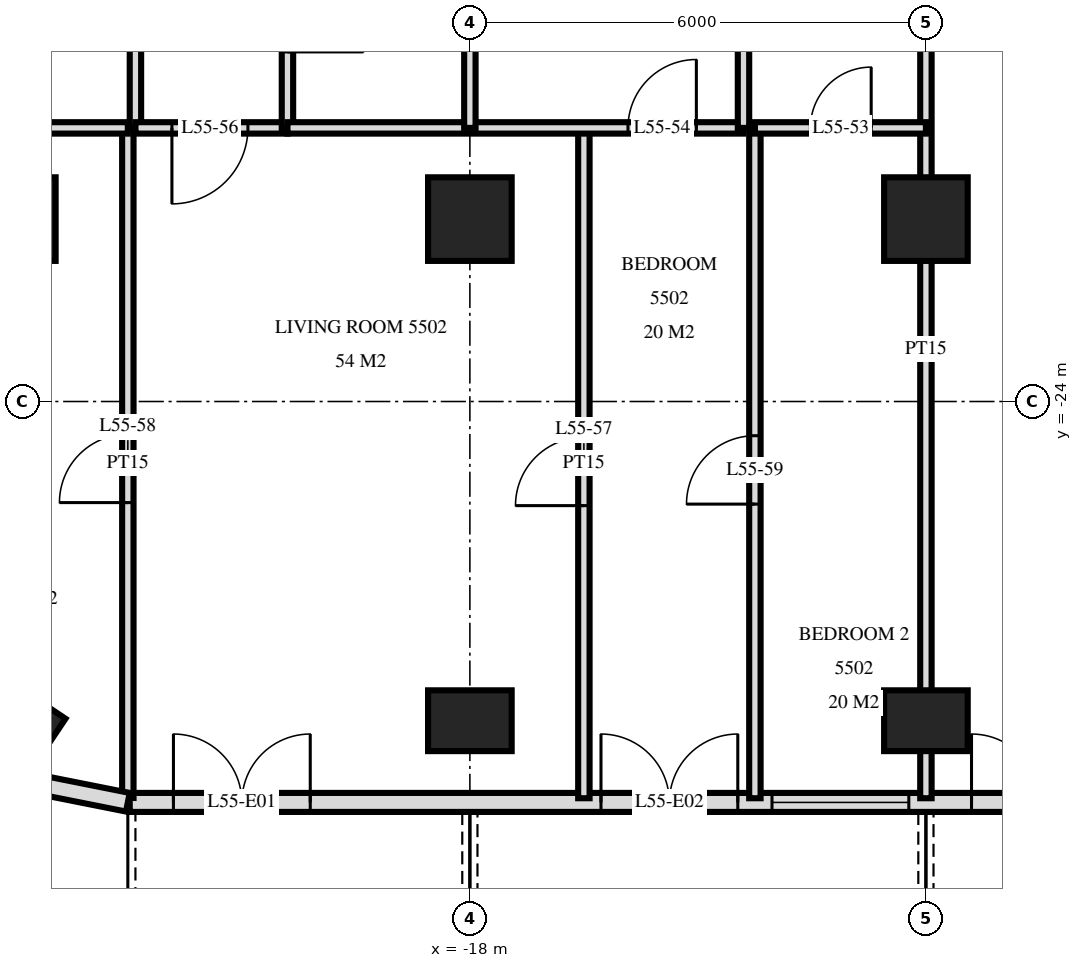
"""IFC4 building model, lengths in metres.
Left out: names, types, materials, properties, quantities, classifications, styles, units other than length and angle.
Written with IfcOpenShell. Run it as: python <this file> out.ifc"""

import sys

from ifc_helpers import new_model, si_unit, direction, frame, frame_2d, origin, origin_2d, place, context, subcontext, project, spatial, rectangle, extrude, element, fill, save


model = new_model("IFC4")
c1 = context("Model", 3, precision=1e-05, world=origin(), true_north=direction((0.0, 1.0)))
c2 = subcontext(c1, "Body", "Model", "MODEL_VIEW")
j1 = project(units=[si_unit("LENGTHUNIT", "METRE"), si_unit("PLANEANGLEUNIT", "RADIAN")], contexts=[c1])
p1 = place(None, origin())
s1 = spatial("IfcSite", under=j1, at=p1, CompositionType="ELEMENT")
p2 = place(p1, origin())
s2 = spatial("IfcBuilding", under=s1, at=p2, CompositionType="ELEMENT")
p3 = place(p2, frame((0.0, 0.0, 211.6)))
s3 = spatial("IfcBuildingStorey", under=s2, at=p3, CompositionType="ELEMENT", Elevation=211.6)
p4 = place(p3, frame((-24.0, -28.2, 0.0), z_axis=(0.0, 0.0, 1.0), x_axis=(-0.831459915646, 0.555584744817, 0.0)))
e1 = element("IfcColumn", 1, at=p4, inside=s3, PredefinedType="COLUMN", context=c2, shape_type="SweptSolid", body=[
    extrude(rectangle(XDim=1.1, YDim=0.8, at=origin_2d()), origin(), (0.0, 0.0, 1.0), 3.5),
])
p5 = place(p3, frame((-24.0, -21.6, 0.0), z_axis=(0.0, 0.0, 1.0), x_axis=(1.0, 0.0, 0.0)))
e2 = element("IfcColumn", 2, at=p5, inside=s3, PredefinedType="COLUMN", context=c2, shape_type="SweptSolid", body=[
    extrude(rectangle(XDim=1.1, YDim=1.1, at=origin_2d()), origin(), (0.0, 0.0, 1.0), 3.5),
])
p6 = place(p3, frame((-18.0, -28.2, 0.0), z_axis=(0.0, 0.0, 1.0), x_axis=(1.0, 0.0, 0.0)))
e3 = element("IfcColumn", 3, at=p6, inside=s3, PredefinedType="COLUMN", context=c2, shape_type="SweptSolid", body=[
    extrude(rectangle(XDim=1.1, YDim=0.8, at=origin_2d()), origin(), (0.0, 0.0, 1.0), 3.5),
])
p7 = place(p3, frame((-18.0, -21.6, 0.0), z_axis=(0.0, 0.0, 1.0), x_axis=(1.0, 0.0, 0.0)))
e4 = element("IfcColumn", 4, at=p7, inside=s3, PredefinedType="COLUMN", context=c2, shape_type="SweptSolid", body=[
    extrude(rectangle(XDim=1.1, YDim=1.1, at=origin_2d()), origin(), (0.0, 0.0, 1.0), 3.5),
])
p8 = place(p3, frame((-12.0, -28.2, 0.0), z_axis=(0.0, 0.0, 1.0), x_axis=(1.0, 0.0, 0.0)))
e5 = element("IfcColumn", 5, at=p8, inside=s3, PredefinedType="COLUMN", context=c2, shape_type="SweptSolid", body=[
    extrude(rectangle(XDim=1.1, YDim=0.8, at=origin_2d()), origin(), (0.0, 0.0, 1.0), 3.5),
])
p9 = place(p3, frame((-12.0, -21.6, 0.0), z_axis=(0.0, 0.0, 1.0), x_axis=(1.0, 0.0, 0.0)))
e6 = element("IfcColumn", 6, at=p9, inside=s3, PredefinedType="COLUMN", context=c2, shape_type="SweptSolid", body=[
    extrude(rectangle(XDim=1.1, YDim=1.1, at=origin_2d()), origin(), (0.0, 0.0, 1.0), 3.5),
])
p10 = place(p3, frame((-24.149, -28.945, 0.0), z_axis=(0.0, 0.0, 1.0), x_axis=(0.980775640221, -0.19513878023, 0.0)))
e7 = element("IfcWall", 7, at=p10, inside=s3, PredefinedType="SOLIDWALL", context=c2, shape_type="SweptSolid", body=[
    extrude(rectangle(XDim=1.681, YDim=0.25, at=frame_2d((0.841, 0.0))), origin(), (0.0, 0.0, 1.0), 3.22),
])
p11 = place(p3, frame((-22.475, -29.275, 0.0), z_axis=(0.0, 0.0, 1.0), x_axis=(1.0, 0.0, 0.0)))
e8 = element("IfcWall", 8, at=p11, inside=s3, PredefinedType="SOLIDWALL", context=c2, shape_type="SweptSolid", body=[
    extrude(rectangle(XDim=44.951, YDim=0.25, at=frame_2d((22.475, 0.0))), origin(), (0.0, 0.0, 1.0), 3.22),
])
p12 = place(p11, frame((0.575, 0.0, 0.0)))
e9 = element("IfcOpeningElement", 9, at=p12, cuts=e8, PredefinedType="OPENING", context=c2, shape_type="SweptSolid", body=[
    extrude(rectangle(XDim=1.8, YDim=2.4, at=frame_2d((0.9, 1.2))), frame((0.0, 0.135, 0.0), z_axis=(0.0, -1.0, 0.0), x_axis=(1.0, 0.0, 0.0)), (0.0, 0.0, 1.0), 0.27),
])
p13 = place(p11, frame((6.2, 0.0, 0.0)))
e10 = element("IfcOpeningElement", 10, at=p13, cuts=e8, PredefinedType="OPENING", context=c2, shape_type="SweptSolid", body=[
    extrude(rectangle(XDim=1.8, YDim=2.4, at=frame_2d((0.9, 1.2))), frame((0.0, 0.135, 0.0), z_axis=(0.0, -1.0, 0.0), x_axis=(1.0, 0.0, 0.0)), (0.0, 0.0, 1.0), 0.27),
])
p14 = place(p11, frame((8.45, 0.0, 0.9)))
e11 = element("IfcOpeningElement", 11, at=p14, cuts=e8, PredefinedType="OPENING", context=c2, shape_type="SweptSolid", body=[
    extrude(rectangle(XDim=1.8, YDim=1.5, at=frame_2d((0.9, 0.75))), frame((0.0, 0.135, 0.0), z_axis=(0.0, -1.0, 0.0), x_axis=(1.0, 0.0, 0.0)), (0.0, 0.0, 1.0), 0.27),
])
p15 = place(p11, frame((11.075, 0.0, 0.0)))
e12 = element("IfcOpeningElement", 12, at=p15, cuts=e8, PredefinedType="OPENING", context=c2, shape_type="SweptSolid", body=[
    extrude(rectangle(XDim=1.8, YDim=2.4, at=frame_2d((0.9, 1.2))), frame((0.0, 0.135, 0.0), z_axis=(0.0, -1.0, 0.0), x_axis=(1.0, 0.0, 0.0)), (0.0, 0.0, 1.0), 0.27),
])
p16 = place(p11, frame((13.775, 0.0, 0.9)))
e13 = element("IfcOpeningElement", 13, at=p16, cuts=e8, PredefinedType="OPENING", context=c2, shape_type="SweptSolid", body=[
    extrude(rectangle(XDim=2.4, YDim=1.5, at=frame_2d((1.2, 0.75))), frame((0.0, 0.135, 0.0), z_axis=(0.0, -1.0, 0.0), x_axis=(1.0, 0.0, 0.0)), (0.0, 0.0, 1.0), 0.27),
])
p17 = place(p11, frame((16.775, 0.0, 0.9)))
e14 = element("IfcOpeningElement", 14, at=p17, cuts=e8, PredefinedType="OPENING", context=c2, shape_type="SweptSolid", body=[
    extrude(rectangle(XDim=2.4, YDim=1.5, at=frame_2d((1.2, 0.75))), frame((0.0, 0.135, 0.0), z_axis=(0.0, -1.0, 0.0), x_axis=(1.0, 0.0, 0.0)), (0.0, 0.0, 1.0), 0.27),
])
p18 = place(p11, frame((20.075, 0.0, 0.0)))
e15 = element("IfcOpeningElement", 15, at=p18, cuts=e8, PredefinedType="OPENING", context=c2, shape_type="SweptSolid", body=[
    extrude(rectangle(XDim=1.8, YDim=2.4, at=frame_2d((0.9, 1.2))), frame((0.0, 0.135, 0.0), z_axis=(0.0, -1.0, 0.0), x_axis=(1.0, 0.0, 0.0)), (0.0, 0.0, 1.0), 0.27),
])
p19 = place(p11, frame((23.075, 0.0, 0.0)))
e16 = element("IfcOpeningElement", 16, at=p19, cuts=e8, PredefinedType="OPENING", context=c2, shape_type="SweptSolid", body=[
    extrude(rectangle(XDim=1.8, YDim=2.4, at=frame_2d((0.9, 1.2))), frame((0.0, 0.135, 0.0), z_axis=(0.0, -1.0, 0.0), x_axis=(1.0, 0.0, 0.0)), (0.0, 0.0, 1.0), 0.27),
])
p20 = place(p11, frame((25.775, 0.0, 0.9)))
e17 = element("IfcOpeningElement", 17, at=p20, cuts=e8, PredefinedType="OPENING", context=c2, shape_type="SweptSolid", body=[
    extrude(rectangle(XDim=2.4, YDim=1.5, at=frame_2d((1.2, 0.75))), frame((0.0, 0.135, 0.0), z_axis=(0.0, -1.0, 0.0), x_axis=(1.0, 0.0, 0.0)), (0.0, 0.0, 1.0), 0.27),
])
p21 = place(p11, frame((29.075, 0.0, 0.0)))
e18 = element("IfcOpeningElement", 18, at=p21, cuts=e8, PredefinedType="OPENING", context=c2, shape_type="SweptSolid", body=[
    extrude(rectangle(XDim=1.8, YDim=2.4, at=frame_2d((0.9, 1.2))), frame((0.0, 0.135, 0.0), z_axis=(0.0, -1.0, 0.0), x_axis=(1.0, 0.0, 0.0)), (0.0, 0.0, 1.0), 0.27),
])
p22 = place(p11, frame((31.775, 0.0, 0.9)))
e19 = element("IfcOpeningElement", 19, at=p22, cuts=e8, PredefinedType="OPENING", context=c2, shape_type="SweptSolid", body=[
    extrude(rectangle(XDim=2.4, YDim=1.5, at=frame_2d((1.2, 0.75))), frame((0.0, 0.135, 0.0), z_axis=(0.0, -1.0, 0.0), x_axis=(1.0, 0.0, 0.0)), (0.0, 0.0, 1.0), 0.27),
])
p23 = place(p11, frame((34.775, 0.0, 0.9)))
e20 = element("IfcOpeningElement", 20, at=p23, cuts=e8, PredefinedType="OPENING", context=c2, shape_type="SweptSolid", body=[
    extrude(rectangle(XDim=2.4, YDim=1.5, at=frame_2d((1.2, 0.75))), frame((0.0, 0.135, 0.0), z_axis=(0.0, -1.0, 0.0), x_axis=(1.0, 0.0, 0.0)), (0.0, 0.0, 1.0), 0.27),
])
p24 = place(p11, frame((38.075, 0.0, 0.0)))
e21 = element("IfcOpeningElement", 21, at=p24, cuts=e8, PredefinedType="OPENING", context=c2, shape_type="SweptSolid", body=[
    extrude(rectangle(XDim=1.8, YDim=2.4, at=frame_2d((0.9, 1.2))), frame((0.0, 0.135, 0.0), z_axis=(0.0, -1.0, 0.0), x_axis=(1.0, 0.0, 0.0)), (0.0, 0.0, 1.0), 0.27),
])
p25 = place(p11, frame((41.075, 0.0, 0.0)))
e22 = element("IfcOpeningElement", 22, at=p25, cuts=e8, PredefinedType="OPENING", context=c2, shape_type="SweptSolid", body=[
    extrude(rectangle(XDim=1.8, YDim=2.4, at=frame_2d((0.9, 1.2))), frame((0.0, 0.135, 0.0), z_axis=(0.0, -1.0, 0.0), x_axis=(1.0, 0.0, 0.0)), (0.0, 0.0, 1.0), 0.27),
])
p26 = place(p3, frame((-12.0, -29.22, 0.0), z_axis=(0.0, 0.0, 1.0), x_axis=(0.0, 1.0, 0.0)))
e23 = element("IfcWall", 23, at=p26, inside=s3, PredefinedType="PARTITIONING", context=c2, shape_type="SweptSolid", body=[
    extrude(rectangle(XDim=11.82, YDim=0.15, at=frame_2d((5.91, 0.0))), origin(), (0.0, 0.0, 1.0), 3.22),
])
p27 = place(p3, frame((-14.25, -29.22, 0.0), z_axis=(0.0, 0.0, 1.0), x_axis=(0.0, 1.0, 0.0)))
e24 = element("IfcWall", 24, at=p27, inside=s3, PredefinedType="PARTITIONING", context=c2, shape_type="SweptSolid", body=[
    extrude(rectangle(XDim=8.82, YDim=0.15, at=frame_2d((4.41, 0.0))), origin(), (0.0, 0.0, 1.0), 3.22),
])
p28 = place(p27, frame((3.87, 0.0, 0.0)))
e25 = element("IfcOpeningElement", 25, at=p28, cuts=e24, PredefinedType="OPENING", context=c2, shape_type="SweptSolid", body=[
    extrude(rectangle(XDim=0.9, YDim=2.1, at=frame_2d((0.45, 1.05))), frame((0.0, 0.085, 0.0), z_axis=(0.0, -1.0, 0.0), x_axis=(1.0, 0.0, 0.0)), (0.0, 0.0, 1.0), 0.17),
])
p29 = place(p3, frame((-14.4, -20.4, 0.0), z_axis=(0.0, 0.0, 1.0), x_axis=(0.0, 1.0, 0.0)))
e26 = element("IfcWall", 26, at=p29, inside=s3, PredefinedType="PARTITIONING", context=c2, shape_type="SweptSolid", body=[
    extrude(rectangle(XDim=3.0, YDim=0.15, at=frame_2d((1.5, 0.0))), origin(), (0.0, 0.0, 1.0), 3.22),
])
p30 = place(p3, frame((-16.5, -29.22, 0.0), z_axis=(0.0, 0.0, 1.0), x_axis=(0.0, 1.0, 0.0)))
e27 = element("IfcWall", 27, at=p30, inside=s3, PredefinedType="PARTITIONING", context=c2, shape_type="SweptSolid", body=[
    extrude(rectangle(XDim=8.82, YDim=0.15, at=frame_2d((4.41, 0.0))), origin(), (0.0, 0.0, 1.0), 3.22),
])
p31 = place(p30, frame((3.85, 0.0, 0.0)))
e28 = element("IfcOpeningElement", 28, at=p31, cuts=e27, PredefinedType="OPENING", context=c2, shape_type="SweptSolid", body=[
    extrude(rectangle(XDim=0.9, YDim=2.1, at=frame_2d((0.45, 1.05))), frame((0.0, 0.085, 0.0), z_axis=(0.0, -1.0, 0.0), x_axis=(1.0, 0.0, 0.0)), (0.0, 0.0, 1.0), 0.17),
])
p32 = place(p3, frame((-18.0, -20.4, 0.0), z_axis=(0.0, 0.0, 1.0), x_axis=(0.0, 1.0, 0.0)))
e29 = element("IfcWall", 29, at=p32, inside=s3, PredefinedType="PARTITIONING", context=c2, shape_type="SweptSolid", body=[
    extrude(rectangle(XDim=3.0, YDim=0.15, at=frame_2d((1.5, 0.0))), origin(), (0.0, 0.0, 1.0), 3.22),
])
p33 = place(p3, frame((-20.4, -20.4, 0.0), z_axis=(0.0, 0.0, 1.0), x_axis=(0.0, 1.0, 0.0)))
e30 = element("IfcWall", 30, at=p33, inside=s3, PredefinedType="PARTITIONING", context=c2, shape_type="SweptSolid", body=[
    extrude(rectangle(XDim=3.0, YDim=0.15, at=frame_2d((1.5, 0.0))), origin(), (0.0, 0.0, 1.0), 3.22),
])
p34 = place(p33, frame((1.0, 0.0, 0.0)))
e31 = element("IfcOpeningElement", 31, at=p34, cuts=e30, PredefinedType="OPENING", context=c2, shape_type="SweptSolid", body=[
    extrude(rectangle(XDim=1.0, YDim=2.1, at=frame_2d((0.5, 1.05))), frame((0.0, 0.085, 0.0), z_axis=(0.0, -1.0, 0.0), x_axis=(1.0, 0.0, 0.0)), (0.0, 0.0, 1.0), 0.17),
])
p35 = place(p3, frame((-22.4, -20.4, 0.0), z_axis=(0.0, 0.0, 1.0), x_axis=(0.0, 1.0, 0.0)))
e32 = element("IfcWall", 32, at=p35, inside=s3, PredefinedType="PARTITIONING", context=c2, shape_type="SweptSolid", body=[
    extrude(rectangle(XDim=3.0, YDim=0.15, at=frame_2d((1.5, 0.0))), origin(), (0.0, 0.0, 1.0), 3.22),
])
p36 = place(p3, frame((-22.5, -29.217, 0.0), z_axis=(0.0, 0.0, 1.0), x_axis=(0.0, 1.0, 0.0)))
e33 = element("IfcWall", 33, at=p36, inside=s3, PredefinedType="PARTITIONING", context=c2, shape_type="SweptSolid", body=[
    extrude(rectangle(XDim=8.817, YDim=0.15, at=frame_2d((4.408, 0.0))), origin(), (0.0, 0.0, 1.0), 3.22),
])
p37 = place(p36, frame((3.886, 0.0, 0.0)))
e34 = element("IfcOpeningElement", 34, at=p37, cuts=e33, PredefinedType="OPENING", context=c2, shape_type="SweptSolid", body=[
    extrude(rectangle(XDim=0.9, YDim=2.1, at=frame_2d((0.45, 1.05))), frame((0.0, 0.085, 0.0), z_axis=(0.0, -1.0, 0.0), x_axis=(1.0, 0.0, 0.0)), (0.0, 0.0, 1.0), 0.17),
])
p38 = place(p3, frame((-22.4, -20.4, 0.0), z_axis=(0.0, 0.0, 1.0), x_axis=(1.0, 0.0, 0.0)))
e35 = element("IfcWall", 35, at=p38, inside=s3, PredefinedType="PARTITIONING", context=c2, shape_type="SweptSolid", body=[
    extrude(rectangle(XDim=2.0, YDim=0.15, at=frame_2d((1.0, 0.0))), origin(), (0.0, 0.0, 1.0), 3.22),
])
p39 = place(p38, frame((0.48, 0.0, 0.0)))
e36 = element("IfcOpeningElement", 36, at=p39, cuts=e35, PredefinedType="OPENING", context=c2, shape_type="SweptSolid", body=[
    extrude(rectangle(XDim=1.0, YDim=2.1, at=frame_2d((0.5, 1.05))), frame((0.0, 0.085, 0.0), z_axis=(0.0, -1.0, 0.0), x_axis=(1.0, 0.0, 0.0)), (0.0, 0.0, 1.0), 0.17),
])
p40 = place(p3, frame((-26.82, -20.4, 0.0), z_axis=(0.0, 0.0, 1.0), x_axis=(1.0, 0.0, 0.0)))
e37 = element("IfcWall", 37, at=p40, inside=s3, PredefinedType="PARTITIONING", context=c2, shape_type="SweptSolid", body=[
    extrude(rectangle(XDim=4.32, YDim=0.15, at=frame_2d((2.16, 0.0))), origin(), (0.0, 0.0, 1.0), 3.22),
])
p41 = place(p3, frame((-20.4, -20.4, 0.0), z_axis=(0.0, 0.0, 1.0), x_axis=(1.0, 0.0, 0.0)))
e38 = element("IfcWall", 38, at=p41, inside=s3, PredefinedType="PARTITIONING", context=c2, shape_type="SweptSolid", body=[
    extrude(rectangle(XDim=6.0, YDim=0.15, at=frame_2d((3.0, 0.0))), origin(), (0.0, 0.0, 1.0), 3.22),
])
p42 = place(p41, frame((4.48, 0.0, 0.0)))
e39 = element("IfcOpeningElement", 39, at=p42, cuts=e38, PredefinedType="OPENING", context=c2, shape_type="SweptSolid", body=[
    extrude(rectangle(XDim=0.9, YDim=2.1, at=frame_2d((0.45, 1.05))), frame((0.0, 0.085, 0.0), z_axis=(0.0, -1.0, 0.0), x_axis=(1.0, 0.0, 0.0)), (0.0, 0.0, 1.0), 0.17),
])
p43 = place(p3, frame((-14.25, -20.4, 0.0), z_axis=(0.0, 0.0, 1.0), x_axis=(1.0, 0.0, 0.0)))
e40 = element("IfcWall", 40, at=p43, inside=s3, PredefinedType="PARTITIONING", context=c2, shape_type="SweptSolid", body=[
    extrude(rectangle(XDim=2.25, YDim=0.15, at=frame_2d((1.125, 0.0))), origin(), (0.0, 0.0, 1.0), 3.22),
])
p44 = place(p43, frame((0.73, 0.0, 0.0)))
e41 = element("IfcOpeningElement", 41, at=p44, cuts=e40, PredefinedType="OPENING", context=c2, shape_type="SweptSolid", body=[
    extrude(rectangle(XDim=0.8, YDim=2.1, at=frame_2d((0.4, 1.05))), frame((0.0, 0.085, 0.0), z_axis=(0.0, -1.0, 0.0), x_axis=(1.0, 0.0, 0.0)), (0.0, 0.0, 1.0), 0.17),
])
p45 = place(p12, origin())
e42 = element("IfcDoor", 42, at=p45, inside=s3, OperationType="DOUBLE_DOOR_SINGLE_SWING", PredefinedType="DOOR", context=c2, shape_type="SweptSolid", body=[
    extrude(rectangle(XDim=1.8, YDim=2.4, at=frame_2d((0.9, 1.2))), frame((0.0, 0.025, 0.0), z_axis=(0.0, -1.0, 0.0), x_axis=(1.0, 0.0, 0.0)), (0.0, 0.0, 1.0), 0.05),
])
fill(e9, e42)
p46 = place(p13, origin())
e43 = element("IfcDoor", 43, at=p46, inside=s3, OperationType="DOUBLE_DOOR_SINGLE_SWING", PredefinedType="DOOR", context=c2, shape_type="SweptSolid", body=[
    extrude(rectangle(XDim=1.8, YDim=2.4, at=frame_2d((0.9, 1.2))), frame((0.0, 0.025, 0.0), z_axis=(0.0, -1.0, 0.0), x_axis=(1.0, 0.0, 0.0)), (0.0, 0.0, 1.0), 0.05),
])
fill(e10, e43)
p47 = place(p14, origin())
e44 = element("IfcWindow", 44, at=p47, inside=s3, PartitioningType="SINGLE_PANEL", PredefinedType="WINDOW", context=c2, shape_type="SweptSolid", body=[
    extrude(rectangle(XDim=1.8, YDim=1.5, at=frame_2d((0.9, 0.75))), frame((0.0, 0.03, 0.0), z_axis=(0.0, -1.0, 0.0), x_axis=(1.0, 0.0, 0.0)), (0.0, 0.0, 1.0), 0.06),
])
fill(e11, e44)
p48 = place(p15, origin())
e45 = element("IfcDoor", 45, at=p48, inside=s3, OperationType="DOUBLE_DOOR_SINGLE_SWING", PredefinedType="DOOR", context=c2, shape_type="SweptSolid", body=[
    extrude(rectangle(XDim=1.8, YDim=2.4, at=frame_2d((0.9, 1.2))), frame((0.0, 0.025, 0.0), z_axis=(0.0, -1.0, 0.0), x_axis=(1.0, 0.0, 0.0)), (0.0, 0.0, 1.0), 0.05),
])
fill(e12, e45)
p49 = place(p44, origin())
e46 = element("IfcDoor", 46, at=p49, inside=s3, OperationType="SINGLE_SWING_LEFT", PredefinedType="DOOR", context=c2, shape_type="SweptSolid", body=[
    extrude(rectangle(XDim=0.8, YDim=2.1, at=frame_2d((0.4, 1.05))), frame((0.0, 0.025, 0.0), z_axis=(0.0, -1.0, 0.0), x_axis=(1.0, 0.0, 0.0)), (0.0, 0.0, 1.0), 0.05),
])
fill(e41, e46)
p50 = place(p42, origin())
e47 = element("IfcDoor", 47, at=p50, inside=s3, OperationType="SINGLE_SWING_LEFT", PredefinedType="DOOR", context=c2, shape_type="SweptSolid", body=[
    extrude(rectangle(XDim=0.9, YDim=2.1, at=frame_2d((0.45, 1.05))), frame((0.0, 0.025, 0.0), z_axis=(0.0, -1.0, 0.0), x_axis=(1.0, 0.0, 0.0)), (0.0, 0.0, 1.0), 0.05),
])
fill(e39, e47)
p51 = place(p39, frame((0.5, 0.0, 0.0), z_axis=(0.0, 0.0, 1.0), x_axis=(-1.0, 0.0, 0.0)))
e48 = element("IfcDoor", 48, at=p51, inside=s3, OperationType="SINGLE_SWING_LEFT", PredefinedType="DOOR", context=c2, shape_type="SweptSolid", body=[
    extrude(rectangle(XDim=1.0, YDim=2.1, at=frame_2d((0.0, 1.05))), frame((0.0, -0.025, 0.0), z_axis=(0.0, 1.0, 0.0), x_axis=(-1.0, 0.0, 0.0)), (0.0, 0.0, 1.0), 0.05),
])
fill(e36, e48)
p52 = place(p31, origin())
e49 = element("IfcDoor", 49, at=p52, inside=s3, OperationType="SINGLE_SWING_RIGHT", PredefinedType="DOOR", context=c2, shape_type="SweptSolid", body=[
    extrude(rectangle(XDim=0.9, YDim=2.1, at=frame_2d((0.45, 1.05))), frame((0.0, 0.025, 0.0), z_axis=(0.0, -1.0, 0.0), x_axis=(1.0, 0.0, 0.0)), (0.0, 0.0, 1.0), 0.05),
])
fill(e28, e49)
p53 = place(p37, origin())
e50 = element("IfcDoor", 50, at=p53, inside=s3, OperationType="SINGLE_SWING_RIGHT", PredefinedType="DOOR", context=c2, shape_type="SweptSolid", body=[
    extrude(rectangle(XDim=0.9, YDim=2.1, at=frame_2d((0.45, 1.05))), frame((0.0, 0.025, 0.0), z_axis=(0.0, -1.0, 0.0), x_axis=(1.0, 0.0, 0.0)), (0.0, 0.0, 1.0), 0.05),
])
fill(e34, e50)
p54 = place(p28, origin())
e51 = element("IfcDoor", 51, at=p54, inside=s3, OperationType="SINGLE_SWING_RIGHT", PredefinedType="DOOR", context=c2, shape_type="SweptSolid", body=[
    extrude(rectangle(XDim=0.9, YDim=2.1, at=frame_2d((0.45, 1.05))), frame((0.0, 0.025, 0.0), z_axis=(0.0, -1.0, 0.0), x_axis=(1.0, 0.0, 0.0)), (0.0, 0.0, 1.0), 0.05),
])
fill(e25, e51)
save(model, sys.argv[1])
